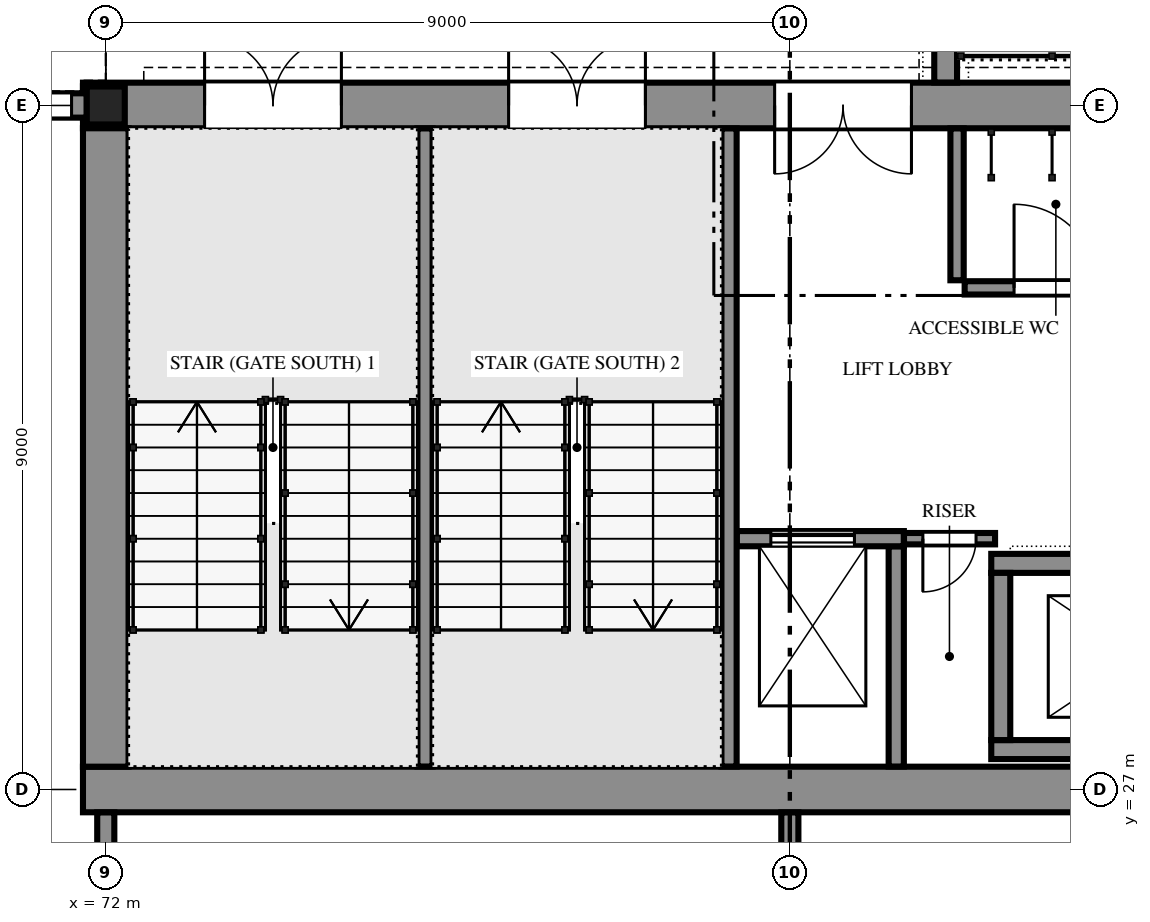
"""IFC4 building model, lengths in metres.
Left out: names, types, materials, properties, quantities, classifications, styles, units other than length and angle.
Written with IfcOpenShell. Run it as: python <this file> out.ifc"""

import sys

from ifc_helpers import new_model, si_unit, direction, frame, frame_2d, origin, origin_2d, place, context, subcontext, project, spatial, polyline, rectangle, hollow_rectangle, outline, extrude, element, fill, save


model = new_model("IFC4")
c1 = context("Model", 3, precision=1e-05, world=origin(), true_north=direction((0.0, 1.0)))
c2 = subcontext(c1, "Body", "Model", "MODEL_VIEW")
j1 = project(units=[si_unit("LENGTHUNIT", "METRE"), si_unit("PLANEANGLEUNIT", "RADIAN")], contexts=[c1])
p1 = place(None, origin())
s1 = spatial("IfcSite", under=j1, at=p1, CompositionType="ELEMENT")
p2 = place(p1, origin())
s2 = spatial("IfcBuilding", under=s1, at=p2, CompositionType="ELEMENT")
p3 = place(p2, origin())
s3 = spatial("IfcBuildingStorey", under=s2, at=p3, CompositionType="ELEMENT", Elevation=0.0)
p4 = place(p3, frame((72.0, 36.0, -2.1), z_axis=(0.0, 0.0, 1.0), x_axis=(1.0, 0.0, 0.0)))
e1 = element("IfcColumn", 1, at=p4, inside=s3, PredefinedType="COLUMN", context=c2, shape_type="SweptSolid", body=[
    extrude(hollow_rectangle(XDim=0.5, YDim=0.5, WallThickness=0.032, at=origin_2d()), origin(), (0.0, 0.0, 1.0), 9.6),
])
p5 = place(p3, frame((71.7, 27.0, -2.1), z_axis=(0.0, 0.0, 1.0), x_axis=(1.0, 0.0, 0.0)))
e2 = element("IfcWall", 2, at=p5, inside=s3, PredefinedType="SOLIDWALL", context=c2, shape_type="SweptSolid", body=[
    extrude(rectangle(XDim=18.6, YDim=0.6, at=frame_2d((9.3, 0.0))), origin(), (0.0, 0.0, 1.0), 9.6),
])
p6 = place(p3, frame((71.7, 36.0, -2.1), z_axis=(0.0, 0.0, 1.0), x_axis=(1.0, 0.0, 0.0)))
e3 = element("IfcWall", 3, at=p6, inside=s3, PredefinedType="SOLIDWALL", context=c2, shape_type="SweptSolid", body=[
    extrude(rectangle(XDim=18.6, YDim=0.6, at=frame_2d((9.3, 0.0))), origin(), (0.0, 0.0, 1.0), 9.6),
])
p7 = place(p6, frame((1.6, 0.0, 2.1)))
e4 = element("IfcOpeningElement", 4, at=p7, cuts=e3, PredefinedType="OPENING", context=c2, shape_type="SweptSolid", body=[
    extrude(rectangle(XDim=1.8, YDim=2.1, at=frame_2d((0.9, 1.05))), frame((0.0, 0.31, 0.0), z_axis=(0.0, -1.0, 0.0), x_axis=(1.0, 0.0, 0.0)), (0.0, 0.0, 1.0), 0.62),
])
p8 = place(p6, frame((5.6, 0.0, 2.1)))
e5 = element("IfcOpeningElement", 5, at=p8, cuts=e3, PredefinedType="OPENING", context=c2, shape_type="SweptSolid", body=[
    extrude(rectangle(XDim=1.8, YDim=2.1, at=frame_2d((0.9, 1.05))), frame((0.0, 0.31, 0.0), z_axis=(0.0, -1.0, 0.0), x_axis=(1.0, 0.0, 0.0)), (0.0, 0.0, 1.0), 0.62),
])
p9 = place(p6, frame((9.1, 0.0, 2.1)))
e6 = element("IfcOpeningElement", 6, at=p9, cuts=e3, PredefinedType="OPENING", context=c2, shape_type="SweptSolid", body=[
    extrude(rectangle(XDim=1.8, YDim=2.1, at=frame_2d((0.9, 1.05))), frame((0.0, 0.31, 0.0), z_axis=(0.0, -1.0, 0.0), x_axis=(1.0, 0.0, 0.0)), (0.0, 0.0, 1.0), 0.62),
])
p10 = place(p3, frame((72.0, 27.3, -2.1), z_axis=(0.0, 0.0, 1.0), x_axis=(0.0, 1.0, 0.0)))
e7 = element("IfcWall", 7, at=p10, inside=s3, PredefinedType="SOLIDWALL", context=c2, shape_type="SweptSolid", body=[
    extrude(rectangle(XDim=8.4, YDim=0.6, at=frame_2d((4.2, 0.0))), origin(), (0.0, 0.0, 1.0), 9.6),
])
p11 = place(p3, frame((63.128, 36.0, 0.0), z_axis=(0.0, 0.0, 1.0), x_axis=(1.0, 0.0, 0.0)))
e8 = element("IfcWall", 8, at=p11, inside=s3, PredefinedType="SOLIDWALL", context=c2, shape_type="SweptSolid", body=[
    extrude(rectangle(XDim=8.622, YDim=0.32, at=frame_2d((4.311, 0.0))), origin(), (0.0, 0.0, 1.0), 6.767),
])
p12 = place(p11, frame((0.322, 0.0, 0.9)))
e9 = element("IfcOpeningElement", 9, at=p12, cuts=e8, PredefinedType="OPENING", context=c2, shape_type="SweptSolid", body=[
    extrude(rectangle(XDim=2.1, YDim=3.0, at=frame_2d((1.05, 1.5))), frame((0.0, 0.17, 0.0), z_axis=(0.0, -1.0, 0.0), x_axis=(1.0, 0.0, 0.0)), (0.0, 0.0, 1.0), 0.34),
])
p13 = place(p11, frame((3.322, 0.0, 0.9)))
e10 = element("IfcOpeningElement", 10, at=p13, cuts=e8, PredefinedType="OPENING", context=c2, shape_type="SweptSolid", body=[
    extrude(rectangle(XDim=2.1, YDim=3.0, at=frame_2d((1.05, 1.5))), frame((0.0, 0.17, 0.0), z_axis=(0.0, -1.0, 0.0), x_axis=(1.0, 0.0, 0.0)), (0.0, 0.0, 1.0), 0.34),
])
p14 = place(p11, frame((6.322, 0.0, 0.9)))
e11 = element("IfcOpeningElement", 11, at=p14, cuts=e8, PredefinedType="OPENING", context=c2, shape_type="SweptSolid", body=[
    extrude(rectangle(XDim=2.1, YDim=3.0, at=frame_2d((1.05, 1.5))), frame((0.0, 0.17, 0.0), z_axis=(0.0, -1.0, 0.0), x_axis=(1.0, 0.0, 0.0)), (0.0, 0.0, 1.0), 0.34),
])
for number, where, z_axis, x_axis in (
    (12, (76.2, 27.302, 0.0), (0.0, 0.0, 1.0), (0.0, 1.0, 0.0)),
    (13, (80.2, 27.302, 0.0), (0.0, 0.0, 1.0), (0.0, 1.0, 0.0)),
):
    element("IfcWall", number, at=place(p3, frame(where, z_axis=z_axis, x_axis=x_axis)), inside=s3, PredefinedType="SOLIDWALL", context=c2, shape_type="SweptSolid", body=[
        extrude(rectangle(XDim=8.396, YDim=0.2, at=frame_2d((4.198, 0.0))), origin(), (0.0, 0.0, 1.0), 6.836),
    ])
p15 = place(p3, frame((83.05, 36.302, 0.0), z_axis=(0.0, 0.0, 1.0), x_axis=(0.0, 1.0, 0.0)))
e14 = element("IfcWall", 14, at=p15, inside=s3, PredefinedType="SOLIDWALL", context=c2, shape_type="SweptSolid", body=[
    extrude(rectangle(XDim=8.098, YDim=0.3, at=frame_2d((4.049, 0.0))), origin(), (0.0, 0.0, 1.0), 6.902),
])
p16 = place(p3, frame((80.302, 30.3, -1.6), z_axis=(0.0, 0.0, 1.0), x_axis=(1.0, 0.0, 0.0)))
e15 = element("IfcWall", 15, at=p16, inside=s3, PredefinedType="SOLIDWALL", context=c2, shape_type="SweptSolid", body=[
    extrude(rectangle(XDim=2.198, YDim=0.2, at=frame_2d((1.099, 0.0))), origin(), (0.0, 0.0, 1.0), 8.357),
])
p17 = place(p16, frame((0.448, 0.0, 1.6)))
e16 = element("IfcOpeningElement", 16, at=p17, cuts=e15, PredefinedType="OPENING", context=c2, shape_type="SweptSolid", body=[
    extrude(rectangle(XDim=1.1, YDim=2.1, at=frame_2d((0.55, 1.05))), frame((0.0, 0.11, 0.0), z_axis=(0.0, -1.0, 0.0), x_axis=(1.0, 0.0, 0.0)), (0.0, 0.0, 1.0), 0.22),
])
p18 = place(p3, frame((82.4, 27.302, -1.6), z_axis=(0.0, 0.0, 1.0), x_axis=(0.0, 1.0, 0.0)))
e17 = element("IfcWall", 17, at=p18, inside=s3, PredefinedType="SOLIDWALL", context=c2, shape_type="SweptSolid", body=[
    extrude(rectangle(XDim=2.898, YDim=0.2, at=frame_2d((1.449, 0.0))), origin(), (0.0, 0.0, 1.0), 8.357),
])
for number, where, z_axis, x_axis in (
    (18, (83.65, 27.525, -1.6), (0.0, 0.0, 1.0), (1.0, 0.0, 0.0)),
    (19, (83.65, 29.975, -1.6), (0.0, 0.0, 1.0), (1.0, 0.0, 0.0)),
):
    element("IfcWall", number, at=place(p3, frame(where, z_axis=z_axis, x_axis=x_axis)), inside=s3, PredefinedType="SOLIDWALL", context=c2, shape_type="SweptSolid", body=[
        extrude(rectangle(XDim=3.4, YDim=0.25, at=frame_2d((1.7, 0.0))), origin(), (0.0, 0.0, 1.0), 8.436),
    ])
p19 = place(p3, frame((83.775, 27.65, -1.6), z_axis=(0.0, 0.0, 1.0), x_axis=(0.0, 1.0, 0.0)))
e20 = element("IfcWall", 20, at=p19, inside=s3, PredefinedType="SOLIDWALL", context=c2, shape_type="SweptSolid", body=[
    extrude(rectangle(XDim=2.2, YDim=0.25, at=frame_2d((1.1, 0.0))), origin(), (0.0, 0.0, 1.0), 8.436),
])
for number, where, z_axis, x_axis in (
    (21, (72.0, 26.698, 0.0), (0.0, 0.0, 1.0), (0.0, -1.0, 0.0)),
    (22, (81.0, 26.698, 0.0), (0.0, 0.0, 1.0), (0.0, -1.0, 0.0)),
):
    element("IfcWall", number, at=place(p3, frame(where, z_axis=z_axis, x_axis=x_axis)), inside=s3, PredefinedType="PARTITIONING", context=c2, shape_type="SweptSolid", body=[
        extrude(rectangle(XDim=5.585, YDim=0.225, at=frame_2d((2.793, 0.0))), origin(), (0.0, 0.0, 1.0), 6.6),
    ])
p20 = place(p3, frame((83.7, 30.3, 0.0), z_axis=(0.0, 0.0, 1.0), x_axis=(-1.0, 0.0, 0.0)))
e23 = element("IfcWall", 23, at=p20, inside=s3, PredefinedType="SOLIDWALL", context=c2, shape_type="SweptSolid", body=[
    extrude(rectangle(XDim=1.198, YDim=0.15, at=frame_2d((0.599, 0.0))), origin(), (0.0, 0.0, 1.0), 6.836),
])
p21 = place(p20, frame((0.25, 0.0, 0.0)))
e24 = element("IfcOpeningElement", 24, at=p21, cuts=e23, PredefinedType="OPENING", context=c2, shape_type="SweptSolid", body=[
    extrude(rectangle(XDim=0.7, YDim=2.0, at=frame_2d((0.35, 1.0))), frame((0.0, 0.085, 0.0), z_axis=(0.0, -1.0, 0.0), x_axis=(1.0, 0.0, 0.0)), (0.0, 0.0, 1.0), 0.17),
])
p22 = place(p3, frame((83.2, 35.698, 0.0), z_axis=(0.0, 0.0, 1.0), x_axis=(0.0, -1.0, 0.0)))
e25 = element("IfcWall", 25, at=p22, inside=s3, PredefinedType="PARTITIONING", context=c2, shape_type="SweptSolid", body=[
    extrude(rectangle(XDim=1.998, YDim=0.175, at=frame_2d((0.999, 0.0))), origin(), (0.0, 0.0, 1.0), 6.459),
])
p23 = place(p3, frame((83.3, 33.6, 0.0), z_axis=(0.0, 0.0, 1.0), x_axis=(1.0, 0.0, 0.0)))
e26 = element("IfcWall", 26, at=p23, inside=s3, PredefinedType="PARTITIONING", context=c2, shape_type="SweptSolid", body=[
    extrude(rectangle(XDim=2.4, YDim=0.175, at=frame_2d((1.2, 0.0))), origin(), (0.0, 0.0, 1.0), 6.459),
])
p24 = place(p23, frame((0.65, 0.0, 0.0)))
e27 = element("IfcOpeningElement", 27, at=p24, cuts=e26, PredefinedType="OPENING", context=c2, shape_type="SweptSolid", body=[
    extrude(rectangle(XDim=1.1, YDim=2.1, at=frame_2d((0.55, 1.05))), frame((0.0, 0.097, 0.0), z_axis=(0.0, -1.0, 0.0), x_axis=(1.0, 0.0, 0.0)), (0.0, 0.0, 1.0), 0.195),
])
p25 = place(p14, origin())
e28 = element("IfcWindow", 28, at=p25, inside=s3, PartitioningType="DOUBLE_PANEL_VERTICAL", PredefinedType="WINDOW", context=c2, shape_type="SweptSolid", body=[
    extrude(outline(polyline([(0.0, 0.0), (2.1, 0.0), (2.1, 3.0), (0.0, 3.0), (0.0, 0.0)]), holes=[polyline([(0.07, 0.07), (2.03, 0.07), (2.03, 2.93), (0.07, 2.93), (0.07, 0.07)])]), frame((0.0, 0.03, 0.0), z_axis=(0.0, -1.0, 0.0), x_axis=(1.0, 0.0, 0.0)), (0.0, 0.0, 1.0), 0.06),
    extrude(rectangle(XDim=0.04, YDim=2.86, at=frame_2d((1.05, 1.5))), frame((0.0, 0.022, 0.0), z_axis=(0.0, -1.0, 0.0), x_axis=(1.0, 0.0, 0.0)), (0.0, 0.0, 1.0), 0.044),
    extrude(outline(polyline([(0.07, 0.07), (1.03, 0.07), (1.03, 2.93), (0.07, 2.93), (0.07, 0.07)]), holes=[polyline([(0.1, 0.1), (1.0, 0.1), (1.0, 2.9), (0.1, 2.9), (0.1, 0.1)])]), frame((0.0, 0.022, 0.0), z_axis=(0.0, -1.0, 0.0), x_axis=(1.0, 0.0, 0.0)), (0.0, 0.0, 1.0), 0.045),
    extrude(rectangle(XDim=0.9, YDim=2.8, at=frame_2d((0.55, 1.5))), frame((0.0, 0.006, 0.0), z_axis=(0.0, -1.0, 0.0), x_axis=(1.0, 0.0, 0.0)), (0.0, 0.0, 1.0), 0.012),
    extrude(outline(polyline([(1.07, 0.07), (2.03, 0.07), (2.03, 2.93), (1.07, 2.93), (1.07, 0.07)]), holes=[polyline([(1.1, 0.1), (2.0, 0.1), (2.0, 2.9), (1.1, 2.9), (1.1, 0.1)])]), frame((0.0, 0.022, 0.0), z_axis=(0.0, -1.0, 0.0), x_axis=(1.0, 0.0, 0.0)), (0.0, 0.0, 1.0), 0.045),
    extrude(rectangle(XDim=0.9, YDim=2.8, at=frame_2d((1.55, 1.5))), frame((0.0, 0.006, 0.0), z_axis=(0.0, -1.0, 0.0), x_axis=(1.0, 0.0, 0.0)), (0.0, 0.0, 1.0), 0.012),
])
fill(e11, e28)
p26 = place(p17, origin())
e29 = element("IfcDoor", 29, at=p26, inside=s3, OperationType="SLIDING_TO_LEFT", PredefinedType="DOOR", context=c2, shape_type="SweptSolid", body=[
    extrude(outline(polyline([(0.0, 0.0), (0.07, 0.0), (0.07, 2.03), (1.03, 2.03), (1.03, 0.0), (1.1, 0.0), (1.1, 2.1), (0.0, 2.1), (0.0, 0.0)])), frame((0.0, 0.025, 0.0), z_axis=(0.0, -1.0, 0.0), x_axis=(1.0, 0.0, 0.0)), (0.0, 0.0, 1.0), 0.05),
    extrude(rectangle(XDim=0.524, YDim=2.016, at=frame_2d((0.336, 1.018))), frame((0.0, 0.018, 0.0), z_axis=(0.0, -1.0, 0.0), x_axis=(1.0, 0.0, 0.0)), (0.0, 0.0, 1.0), 0.016),
    extrude(rectangle(XDim=0.52, YDim=2.016, at=frame_2d((0.766, 1.018))), frame((0.0, -0.002, 0.0), z_axis=(0.0, -1.0, 0.0), x_axis=(1.0, 0.0, 0.0)), (0.0, 0.0, 1.0), 0.016),
])
fill(e16, e29)
p27 = place(p7, origin())
e30 = element("IfcDoor", 30, at=p27, inside=s3, OperationType="DOUBLE_DOOR_SINGLE_SWING", PredefinedType="DOOR", context=c2, shape_type="SweptSolid", body=[
    extrude(outline(polyline([(0.0, 0.0), (0.07, 0.0), (0.07, 2.03), (1.73, 2.03), (1.73, 0.0), (1.8, 0.0), (1.8, 2.1), (0.0, 2.1), (0.0, 0.0)])), frame((0.0, 0.025, 0.0), z_axis=(0.0, -1.0, 0.0), x_axis=(1.0, 0.0, 0.0)), (0.0, 0.0, 1.0), 0.05),
    extrude(outline(polyline([(0.074, 0.01), (0.897, 0.01), (0.897, 2.026), (0.074, 2.026), (0.074, 0.01)]), holes=[polyline([(0.194, 0.16), (0.777, 0.16), (0.777, 1.01), (0.194, 1.01), (0.194, 0.16)]), polyline([(0.335, 1.16), (0.635, 1.16), (0.635, 1.76), (0.335, 1.76), (0.335, 1.16)])]), frame((0.0, 0.017, 0.0), z_axis=(0.0, -1.0, 0.0), x_axis=(1.0, 0.0, 0.0)), (0.0, 0.0, 1.0), 0.035),
    extrude(rectangle(XDim=0.583, YDim=0.85, at=frame_2d((0.485, 0.585))), frame((0.0, 0.009, 0.0), z_axis=(0.0, -1.0, 0.0), x_axis=(1.0, 0.0, 0.0)), (0.0, 0.0, 1.0), 0.017),
    extrude(rectangle(XDim=0.3, YDim=0.6, at=frame_2d((0.485, 1.46))), frame((0.0, 0.006, 0.0), z_axis=(0.0, -1.0, 0.0), x_axis=(1.0, 0.0, 0.0)), (0.0, 0.0, 1.0), 0.012),
    extrude(outline(polyline([(0.903, 0.01), (1.726, 0.01), (1.726, 2.026), (0.903, 2.026), (0.903, 0.01)]), holes=[polyline([(1.023, 0.16), (1.606, 0.16), (1.606, 1.01), (1.023, 1.01), (1.023, 0.16)]), polyline([(1.165, 1.16), (1.465, 1.16), (1.465, 1.76), (1.165, 1.76), (1.165, 1.16)])]), frame((0.0, 0.017, 0.0), z_axis=(0.0, -1.0, 0.0), x_axis=(1.0, 0.0, 0.0)), (0.0, 0.0, 1.0), 0.035),
    extrude(rectangle(XDim=0.583, YDim=0.85, at=frame_2d((1.314, 0.585))), frame((0.0, 0.009, 0.0), z_axis=(0.0, -1.0, 0.0), x_axis=(1.0, 0.0, 0.0)), (0.0, 0.0, 1.0), 0.017),
    extrude(rectangle(XDim=0.3, YDim=0.6, at=frame_2d((1.314, 1.46))), frame((0.0, 0.006, 0.0), z_axis=(0.0, -1.0, 0.0), x_axis=(1.0, 0.0, 0.0)), (0.0, 0.0, 1.0), 0.012),
])
fill(e4, e30)
p28 = place(p8, origin())
e31 = element("IfcDoor", 31, at=p28, inside=s3, OperationType="DOUBLE_DOOR_SINGLE_SWING", PredefinedType="DOOR", context=c2, shape_type="SweptSolid", body=[
    extrude(outline(polyline([(0.0, 0.0), (0.07, 0.0), (0.07, 2.03), (1.73, 2.03), (1.73, 0.0), (1.8, 0.0), (1.8, 2.1), (0.0, 2.1), (0.0, 0.0)])), frame((0.0, 0.025, 0.0), z_axis=(0.0, -1.0, 0.0), x_axis=(1.0, 0.0, 0.0)), (0.0, 0.0, 1.0), 0.05),
    extrude(outline(polyline([(0.074, 0.01), (0.897, 0.01), (0.897, 2.026), (0.074, 2.026), (0.074, 0.01)]), holes=[polyline([(0.194, 0.16), (0.777, 0.16), (0.777, 1.01), (0.194, 1.01), (0.194, 0.16)]), polyline([(0.335, 1.16), (0.635, 1.16), (0.635, 1.76), (0.335, 1.76), (0.335, 1.16)])]), frame((0.0, 0.017, 0.0), z_axis=(0.0, -1.0, 0.0), x_axis=(1.0, 0.0, 0.0)), (0.0, 0.0, 1.0), 0.035),
    extrude(rectangle(XDim=0.583, YDim=0.85, at=frame_2d((0.485, 0.585))), frame((0.0, 0.009, 0.0), z_axis=(0.0, -1.0, 0.0), x_axis=(1.0, 0.0, 0.0)), (0.0, 0.0, 1.0), 0.017),
    extrude(rectangle(XDim=0.3, YDim=0.6, at=frame_2d((0.485, 1.46))), frame((0.0, 0.006, 0.0), z_axis=(0.0, -1.0, 0.0), x_axis=(1.0, 0.0, 0.0)), (0.0, 0.0, 1.0), 0.012),
    extrude(outline(polyline([(0.903, 0.01), (1.726, 0.01), (1.726, 2.026), (0.903, 2.026), (0.903, 0.01)]), holes=[polyline([(1.023, 0.16), (1.606, 0.16), (1.606, 1.01), (1.023, 1.01), (1.023, 0.16)]), polyline([(1.165, 1.16), (1.465, 1.16), (1.465, 1.76), (1.165, 1.76), (1.165, 1.16)])]), frame((0.0, 0.017, 0.0), z_axis=(0.0, -1.0, 0.0), x_axis=(1.0, 0.0, 0.0)), (0.0, 0.0, 1.0), 0.035),
    extrude(rectangle(XDim=0.583, YDim=0.85, at=frame_2d((1.314, 0.585))), frame((0.0, 0.009, 0.0), z_axis=(0.0, -1.0, 0.0), x_axis=(1.0, 0.0, 0.0)), (0.0, 0.0, 1.0), 0.017),
    extrude(rectangle(XDim=0.3, YDim=0.6, at=frame_2d((1.314, 1.46))), frame((0.0, 0.006, 0.0), z_axis=(0.0, -1.0, 0.0), x_axis=(1.0, 0.0, 0.0)), (0.0, 0.0, 1.0), 0.012),
])
fill(e5, e31)
p29 = place(p9, frame((1.8, 0.0, 0.0), z_axis=(0.0, 0.0, 1.0), x_axis=(-1.0, 0.0, 0.0)))
e32 = element("IfcDoor", 32, at=p29, inside=s3, OperationType="DOUBLE_DOOR_SINGLE_SWING", PredefinedType="DOOR", context=c2, shape_type="SweptSolid", body=[
    extrude(outline(polyline([(0.0, 0.0), (0.07, 0.0), (0.07, 2.03), (1.73, 2.03), (1.73, 0.0), (1.8, 0.0), (1.8, 2.1), (0.0, 2.1), (0.0, 0.0)])), frame((0.0, 0.025, 0.0), z_axis=(0.0, -1.0, 0.0), x_axis=(1.0, 0.0, 0.0)), (0.0, 0.0, 1.0), 0.05),
    extrude(outline(polyline([(0.074, 0.01), (0.897, 0.01), (0.897, 2.026), (0.074, 2.026), (0.074, 0.01)]), holes=[polyline([(0.194, 0.16), (0.777, 0.16), (0.777, 1.01), (0.194, 1.01), (0.194, 0.16)]), polyline([(0.335, 1.16), (0.635, 1.16), (0.635, 1.76), (0.335, 1.76), (0.335, 1.16)])]), frame((0.0, 0.017, 0.0), z_axis=(0.0, -1.0, 0.0), x_axis=(1.0, 0.0, 0.0)), (0.0, 0.0, 1.0), 0.035),
    extrude(rectangle(XDim=0.583, YDim=0.85, at=frame_2d((0.485, 0.585))), frame((0.0, 0.009, 0.0), z_axis=(0.0, -1.0, 0.0), x_axis=(1.0, 0.0, 0.0)), (0.0, 0.0, 1.0), 0.017),
    extrude(rectangle(XDim=0.3, YDim=0.6, at=frame_2d((0.485, 1.46))), frame((0.0, 0.006, 0.0), z_axis=(0.0, -1.0, 0.0), x_axis=(1.0, 0.0, 0.0)), (0.0, 0.0, 1.0), 0.012),
    extrude(outline(polyline([(0.903, 0.01), (1.726, 0.01), (1.726, 2.026), (0.903, 2.026), (0.903, 0.01)]), holes=[polyline([(1.023, 0.16), (1.606, 0.16), (1.606, 1.01), (1.023, 1.01), (1.023, 0.16)]), polyline([(1.165, 1.16), (1.465, 1.16), (1.465, 1.76), (1.165, 1.76), (1.165, 1.16)])]), frame((0.0, 0.017, 0.0), z_axis=(0.0, -1.0, 0.0), x_axis=(1.0, 0.0, 0.0)), (0.0, 0.0, 1.0), 0.035),
    extrude(rectangle(XDim=0.583, YDim=0.85, at=frame_2d((1.314, 0.585))), frame((0.0, 0.009, 0.0), z_axis=(0.0, -1.0, 0.0), x_axis=(1.0, 0.0, 0.0)), (0.0, 0.0, 1.0), 0.017),
    extrude(rectangle(XDim=0.3, YDim=0.6, at=frame_2d((1.314, 1.46))), frame((0.0, 0.006, 0.0), z_axis=(0.0, -1.0, 0.0), x_axis=(1.0, 0.0, 0.0)), (0.0, 0.0, 1.0), 0.012),
])
fill(e6, e32)
p30 = place(p21, origin())
e33 = element("IfcDoor", 33, at=p30, inside=s3, OperationType="SINGLE_SWING_RIGHT", PredefinedType="DOOR", context=c2, shape_type="SweptSolid", body=[
    extrude(outline(polyline([(0.0, 0.0), (0.07, 0.0), (0.07, 1.93), (0.63, 1.93), (0.63, 0.0), (0.7, 0.0), (0.7, 2.0), (0.0, 2.0), (0.0, 0.0)])), frame((0.0, 0.025, 0.0), z_axis=(0.0, -1.0, 0.0), x_axis=(1.0, 0.0, 0.0)), (0.0, 0.0, 1.0), 0.05),
    extrude(outline(polyline([(0.074, 0.01), (0.626, 0.01), (0.626, 1.926), (0.074, 1.926), (0.074, 0.01)]), holes=[polyline([(0.184, 0.16), (0.516, 0.16), (0.516, 1.01), (0.184, 1.01), (0.184, 0.16)]), polyline([(0.2, 1.16), (0.5, 1.16), (0.5, 1.76), (0.2, 1.76), (0.2, 1.16)])]), frame((0.0, 0.017, 0.0), z_axis=(0.0, -1.0, 0.0), x_axis=(1.0, 0.0, 0.0)), (0.0, 0.0, 1.0), 0.035),
    extrude(rectangle(XDim=0.331, YDim=0.85, at=frame_2d((0.35, 0.585))), frame((0.0, 0.009, 0.0), z_axis=(0.0, -1.0, 0.0), x_axis=(1.0, 0.0, 0.0)), (0.0, 0.0, 1.0), 0.017),
    extrude(rectangle(XDim=0.3, YDim=0.6, at=frame_2d((0.35, 1.46))), frame((0.0, 0.006, 0.0), z_axis=(0.0, -1.0, 0.0), x_axis=(1.0, 0.0, 0.0)), (0.0, 0.0, 1.0), 0.012),
])
fill(e24, e33)
p31 = place(p24, origin())
e34 = element("IfcDoor", 34, at=p31, inside=s3, OperationType="SINGLE_SWING_LEFT", PredefinedType="DOOR", context=c2, shape_type="SweptSolid", body=[
    extrude(outline(polyline([(0.0, 0.0), (0.07, 0.0), (0.07, 2.03), (1.03, 2.03), (1.03, 0.0), (1.1, 0.0), (1.1, 2.1), (0.0, 2.1), (0.0, 0.0)])), frame((0.0, 0.025, 0.0), z_axis=(0.0, -1.0, 0.0), x_axis=(1.0, 0.0, 0.0)), (0.0, 0.0, 1.0), 0.05),
    extrude(outline(polyline([(0.074, 0.01), (1.026, 0.01), (1.026, 2.026), (0.074, 2.026), (0.074, 0.01)]), holes=[polyline([(0.194, 0.16), (0.906, 0.16), (0.906, 1.01), (0.194, 1.01), (0.194, 0.16)]), polyline([(0.4, 1.16), (0.7, 1.16), (0.7, 1.76), (0.4, 1.76), (0.4, 1.16)])]), frame((0.0, 0.017, 0.0), z_axis=(0.0, -1.0, 0.0), x_axis=(1.0, 0.0, 0.0)), (0.0, 0.0, 1.0), 0.035),
    extrude(rectangle(XDim=0.712, YDim=0.85, at=frame_2d((0.55, 0.585))), frame((0.0, 0.009, 0.0), z_axis=(0.0, -1.0, 0.0), x_axis=(1.0, 0.0, 0.0)), (0.0, 0.0, 1.0), 0.017),
    extrude(rectangle(XDim=0.3, YDim=0.6, at=frame_2d((0.55, 1.46))), frame((0.0, 0.006, 0.0), z_axis=(0.0, -1.0, 0.0), x_axis=(1.0, 0.0, 0.0)), (0.0, 0.0, 1.0), 0.012),
])
fill(e27, e34)
save(model, sys.argv[1])
